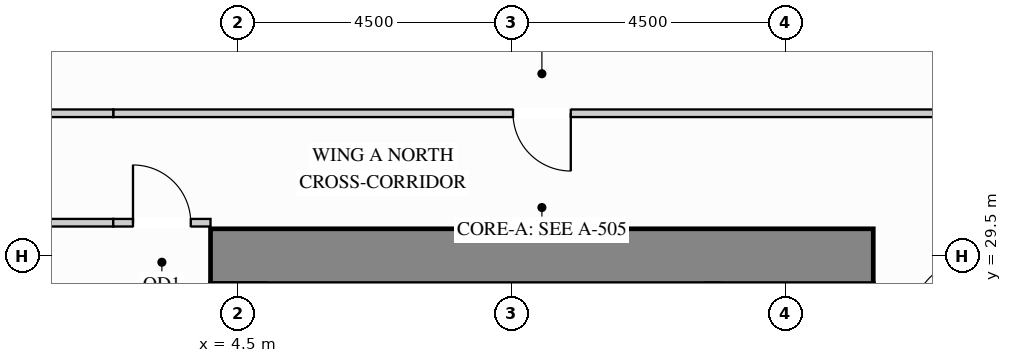
"""IFC4 building model, lengths in metres.
Left out: names, types, materials, properties, quantities, classifications, styles, units other than length and angle.
Written with IfcOpenShell. Run it as: python <this file> out.ifc"""

import sys

from ifc_helpers import new_model, si_unit, direction, frame, frame_2d, origin, place, context, subcontext, project, spatial, rectangle, extrude, source, transform, mapped, element, fill, save


model = new_model("IFC4")
c1 = context("Model", 3, precision=1e-05, world=origin(), true_north=direction((0.0, 1.0)))
c2 = subcontext(c1, "Body", "Model", "MODEL_VIEW")
j1 = project(units=[si_unit("LENGTHUNIT", "METRE"), si_unit("PLANEANGLEUNIT", "RADIAN")], contexts=[c1])
p1 = place(None, origin())
s1 = spatial("IfcSite", under=j1, at=p1, CompositionType="ELEMENT")
p2 = place(p1, origin())
s2 = spatial("IfcBuilding", under=s1, at=p2, CompositionType="ELEMENT")
p3 = place(p2, frame((0.0, 0.0, 69.3)))
s3 = spatial("IfcBuildingStorey", under=s2, at=p3, CompositionType="ELEMENT", Elevation=69.3)
m1 = source(origin(), c2, "Body", "SweptSolid", [
    extrude(rectangle(XDim=10.9, YDim=0.9, at=frame_2d((5.45, 0.0))), origin(), (0.0, 0.0, 1.0), 3.32),
])
p4 = place(p3, frame((4.05, 29.5, 0.0), z_axis=(0.0, 0.0, 1.0), x_axis=(1.0, 0.0, 0.0)))
e1 = element("IfcWall", 1, at=p4, inside=s3, PredefinedType="SHEAR", context=c2, shape_type="MappedRepresentation", body=[
    mapped(m1, transform((0.0, 0.0, 0.0), x_axis=(1.0, 0.0, 0.0), y_axis=(0.0, 1.0, 0.0), z_axis=(0.0, 0.0, 1.0))),
])
p5 = place(p3, frame((2.45, 31.85, 0.0), z_axis=(0.0, 0.0, 1.0), x_axis=(1.0, 0.0, 0.0)))
e2 = element("IfcWall", 2, at=p5, inside=s3, PredefinedType="PARTITIONING", context=c2, shape_type="SweptSolid", body=[
    extrude(rectangle(XDim=14.1, YDim=0.125, at=frame_2d((7.05, 0.0))), origin(), (0.0, 0.0, 1.0), 2.768),
])
p6 = place(p5, frame((6.575, 0.0, 0.0)))
e3 = element("IfcOpeningElement", 3, at=p6, cuts=e2, PredefinedType="OPENING", context=c2, shape_type="SweptSolid", body=[
    extrude(rectangle(XDim=0.95, YDim=2.15, at=frame_2d((0.475, 1.075))), frame((0.0, 0.073, 0.0), z_axis=(0.0, -1.0, 0.0), x_axis=(1.0, 0.0, 0.0)), (0.0, 0.0, 1.0), 0.145),
])
m2 = source(origin(), c2, "Body", "SweptSolid", [
    extrude(rectangle(XDim=2.098, YDim=0.125, at=frame_2d((1.049, 0.0))), origin(), (0.0, 0.0, 1.0), 2.768),
])
p7 = place(p3, frame((0.352, 31.85, 0.0), z_axis=(0.0, 0.0, 1.0), x_axis=(1.0, 0.0, 0.0)))
e4 = element("IfcWall", 4, at=p7, inside=s3, PredefinedType="PARTITIONING", context=c2, shape_type="MappedRepresentation", body=[
    mapped(m2, transform((0.0, 0.0, 0.0), x_axis=(1.0, 0.0, 0.0), y_axis=(0.0, 1.0, 0.0), z_axis=(0.0, 0.0, 1.0))),
])
m3 = source(origin(), c2, "Body", "SweptSolid", [
    extrude(rectangle(XDim=1.19, YDim=0.125, at=frame_2d((0.595, 0.0))), origin(), (0.0, 0.0, 1.0), 3.305),
])
p8 = place(p3, frame((1.26, 30.05, 0.0), z_axis=(0.0, 0.0, 1.0), x_axis=(1.0, 0.0, 0.0)))
e5 = element("IfcWall", 5, at=p8, inside=s3, PredefinedType="PARTITIONING", context=c2, shape_type="MappedRepresentation", body=[
    mapped(m3, transform((0.0, 0.0, 0.0), x_axis=(1.0, 0.0, 0.0), y_axis=(0.0, 1.0, 0.0), z_axis=(0.0, 0.0, 1.0))),
])
p9 = place(p3, frame((2.45, 30.05, 0.0), z_axis=(0.0, 0.0, 1.0), x_axis=(1.0, 0.0, 0.0)))
e6 = element("IfcWall", 6, at=p9, inside=s3, PredefinedType="PARTITIONING", context=c2, shape_type="SweptSolid", body=[
    extrude(rectangle(XDim=1.6, YDim=0.125, at=frame_2d((0.8, 0.0))), origin(), (0.0, 0.0, 1.0), 3.305),
])
p10 = place(p9, frame((0.325, 0.0, 0.0)))
e7 = element("IfcOpeningElement", 7, at=p10, cuts=e6, PredefinedType="OPENING", context=c2, shape_type="SweptSolid", body=[
    extrude(rectangle(XDim=0.95, YDim=2.15, at=frame_2d((0.475, 1.075))), frame((0.0, 0.073, 0.0), z_axis=(0.0, -1.0, 0.0), x_axis=(1.0, 0.0, 0.0)), (0.0, 0.0, 1.0), 0.145),
])
m4 = source(origin(), c2, "Body", "SweptSolid", [
    extrude(rectangle(XDim=0.95, YDim=2.15, at=frame_2d((0.475, 1.075))), frame((0.0, 0.025, 0.0), z_axis=(0.0, -1.0, 0.0), x_axis=(1.0, 0.0, 0.0)), (0.0, 0.0, 1.0), 0.05),
])
p11 = place(p6, origin())
e8 = element("IfcDoor", 8, at=p11, inside=s3, OperationType="SINGLE_SWING_RIGHT", PredefinedType="DOOR", context=c2, shape_type="MappedRepresentation", body=[
    mapped(m4, transform((0.0, 0.0, 0.0), x_axis=(1.0, 0.0, 0.0), y_axis=(0.0, 1.0, 0.0), z_axis=(0.0, 0.0, 1.0))),
])
fill(e3, e8)
p12 = place(p10, origin())
e9 = element("IfcDoor", 9, at=p12, inside=s3, OperationType="SINGLE_SWING_LEFT", PredefinedType="DOOR", context=c2, shape_type="MappedRepresentation", body=[
    mapped(m4, transform((0.0, 0.0, 0.0), x_axis=(1.0, 0.0, 0.0), y_axis=(0.0, 1.0, 0.0), z_axis=(0.0, 0.0, 1.0))),
])
fill(e7, e9)
save(model, sys.argv[1])
